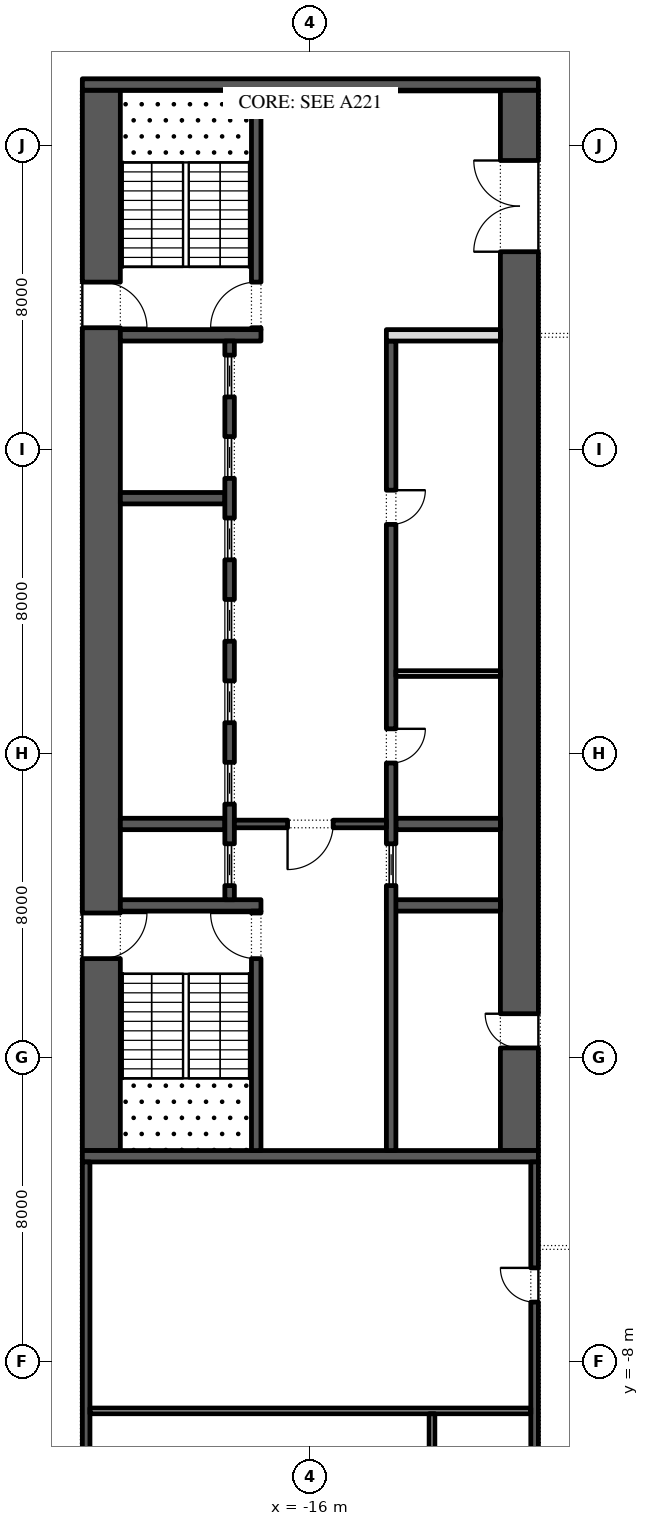
"""IFC4 building model, lengths in metres.
Left out: names, types, materials, properties, quantities, classifications, styles, units other than length and angle.
Written with IfcOpenShell. Run it as: python <this file> out.ifc"""

import sys

from ifc_helpers import new_model, si_unit, direction, frame, frame_2d, origin, place, context, subcontext, project, spatial, rectangle, extrude, element, fill, save


model = new_model("IFC4")
c1 = context("Model", 3, precision=1e-05, world=origin(), true_north=direction((0.0, 1.0)))
c2 = subcontext(c1, "Body", "Model", "MODEL_VIEW")
j1 = project(units=[si_unit("LENGTHUNIT", "METRE"), si_unit("PLANEANGLEUNIT", "RADIAN")], contexts=[c1])
p1 = place(None, origin())
s1 = spatial("IfcSite", under=j1, at=p1, CompositionType="ELEMENT")
p2 = place(p1, origin())
s2 = spatial("IfcBuilding", under=s1, at=p2, CompositionType="ELEMENT")
p3 = place(p2, frame((0.0, 0.0, 85.8)))
s3 = spatial("IfcBuildingStorey", under=s2, at=p3, CompositionType="ELEMENT", Elevation=85.8)
p4 = place(p3, frame((-21.5, -2.45, 0.0), z_axis=(0.0, 0.0, 1.0), x_axis=(0.0, 1.0, 0.0)))
e1 = element("IfcWall", 1, at=p4, inside=s3, PredefinedType="SHEAR", context=c2, shape_type="SweptSolid", body=[
    extrude(rectangle(XDim=27.9, YDim=1.0, at=frame_2d((13.95, 0.0))), origin(), (0.0, 0.0, 1.0), 3.95),
])
p5 = place(p4, frame((5.05, 0.0, 0.0)))
e2 = element("IfcOpeningElement", 2, at=p5, cuts=e1, PredefinedType="OPENING", context=c2, shape_type="SweptSolid", body=[
    extrude(rectangle(XDim=1.2, YDim=2.1, at=frame_2d((0.6, 1.05))), frame((0.0, 0.51, 0.0), z_axis=(0.0, -1.0, 0.0), x_axis=(1.0, 0.0, 0.0)), (0.0, 0.0, 1.0), 1.02),
])
p6 = place(p4, frame((21.65, 0.0, 0.0)))
e3 = element("IfcOpeningElement", 3, at=p6, cuts=e1, PredefinedType="OPENING", context=c2, shape_type="SweptSolid", body=[
    extrude(rectangle(XDim=1.2, YDim=2.1, at=frame_2d((0.6, 1.05))), frame((0.0, 0.51, 0.0), z_axis=(0.0, -1.0, 0.0), x_axis=(1.0, 0.0, 0.0)), (0.0, 0.0, 1.0), 1.02),
])
p7 = place(p3, frame((-10.5, -2.45, 0.0), z_axis=(0.0, 0.0, 1.0), x_axis=(0.0, 1.0, 0.0)))
e4 = element("IfcWall", 4, at=p7, inside=s3, PredefinedType="SHEAR", context=c2, shape_type="SweptSolid", body=[
    extrude(rectangle(XDim=27.9, YDim=1.0, at=frame_2d((13.95, 0.0))), origin(), (0.0, 0.0, 1.0), 3.95),
])
p8 = place(p7, frame((23.65, 0.0, 0.0)))
e5 = element("IfcOpeningElement", 5, at=p8, cuts=e4, PredefinedType="OPENING", context=c2, shape_type="SweptSolid", body=[
    extrude(rectangle(XDim=2.4, YDim=2.1, at=frame_2d((1.2, 1.05))), frame((0.0, 0.51, 0.0), z_axis=(0.0, -1.0, 0.0), x_axis=(1.0, 0.0, 0.0)), (0.0, 0.0, 1.0), 1.02),
])
p9 = place(p7, frame((2.7, 0.0, 0.0)))
e6 = element("IfcOpeningElement", 6, at=p9, cuts=e4, PredefinedType="OPENING", context=c2, shape_type="SweptSolid", body=[
    extrude(rectangle(XDim=0.9, YDim=2.1, at=frame_2d((0.45, 1.05))), frame((0.0, 0.51, 0.0), z_axis=(0.0, -1.0, 0.0), x_axis=(1.0, 0.0, 0.0)), (0.0, 0.0, 1.0), 1.02),
])
for number, where, z_axis, x_axis in (
    (7, (-22.0, -2.6, 0.0), (0.0, 0.0, 1.0), (1.0, 0.0, 0.0)),
    (8, (-22.0, 25.6, 0.0), (0.0, 0.0, 1.0), (1.0, 0.0, 0.0)),
):
    element("IfcWall", number, at=place(p3, frame(where, z_axis=z_axis, x_axis=x_axis)), inside=s3, PredefinedType="SHEAR", context=c2, shape_type="SweptSolid", body=[
        extrude(rectangle(XDim=12.0, YDim=0.3, at=frame_2d((6.0, 0.0))), origin(), (0.0, 0.0, 1.0), 3.95),
    ])
p10 = place(p3, frame((-21.0, 4.0, 0.0), z_axis=(0.0, 0.0, 1.0), x_axis=(1.0, 0.0, 0.0)))
e9 = element("IfcWall", 9, at=p10, inside=s3, PredefinedType="SHEAR", context=c2, shape_type="SweptSolid", body=[
    extrude(rectangle(XDim=3.7, YDim=0.3, at=frame_2d((1.85, 0.0))), origin(), (0.0, 0.0, 1.0), 3.95),
])
p11 = place(p3, frame((-17.425, -2.45, 0.0), z_axis=(0.0, 0.0, 1.0), x_axis=(0.0, 1.0, 0.0)))
e10 = element("IfcWall", 10, at=p11, inside=s3, PredefinedType="SHEAR", context=c2, shape_type="SweptSolid", body=[
    extrude(rectangle(XDim=6.3, YDim=0.25, at=frame_2d((3.15, 0.0))), origin(), (0.0, 0.0, 1.0), 3.95),
])
p12 = place(p11, frame((5.05, 0.0, 0.0)))
e11 = element("IfcOpeningElement", 11, at=p12, cuts=e10, PredefinedType="OPENING", context=c2, shape_type="SweptSolid", body=[
    extrude(rectangle(XDim=1.2, YDim=2.1, at=frame_2d((0.6, 1.05))), frame((0.0, 0.135, 0.0), z_axis=(0.0, -1.0, 0.0), x_axis=(1.0, 0.0, 0.0)), (0.0, 0.0, 1.0), 0.27),
])
p13 = place(p3, frame((-21.0, 19.0, 0.0), z_axis=(0.0, 0.0, 1.0), x_axis=(1.0, 0.0, 0.0)))
e12 = element("IfcWall", 12, at=p13, inside=s3, PredefinedType="SHEAR", context=c2, shape_type="SweptSolid", body=[
    extrude(rectangle(XDim=3.7, YDim=0.3, at=frame_2d((1.85, 0.0))), origin(), (0.0, 0.0, 1.0), 3.95),
])
p14 = place(p3, frame((-17.425, 19.15, 0.0), z_axis=(0.0, 0.0, 1.0), x_axis=(0.0, 1.0, 0.0)))
e13 = element("IfcWall", 13, at=p14, inside=s3, PredefinedType="SHEAR", context=c2, shape_type="SweptSolid", body=[
    extrude(rectangle(XDim=6.3, YDim=0.25, at=frame_2d((3.15, 0.0))), origin(), (0.0, 0.0, 1.0), 3.95),
])
p15 = place(p14, frame((0.05, 0.0, 0.0)))
e14 = element("IfcOpeningElement", 14, at=p15, cuts=e13, PredefinedType="OPENING", context=c2, shape_type="SweptSolid", body=[
    extrude(rectangle(XDim=1.2, YDim=2.1, at=frame_2d((0.6, 1.05))), frame((0.0, 0.135, 0.0), z_axis=(0.0, -1.0, 0.0), x_axis=(1.0, 0.0, 0.0)), (0.0, 0.0, 1.0), 0.27),
])
for number, where, z_axis, x_axis in (
    (15, (-21.0, 6.143, 0.0), (0.0, 0.0, 1.0), (1.0, 0.0, 0.0)),
    (16, (-21.0, 14.714, 0.0), (0.0, 0.0, 1.0), (1.0, 0.0, 0.0)),
):
    element("IfcWall", number, at=place(p3, frame(where, z_axis=z_axis, x_axis=x_axis)), inside=s3, PredefinedType="SHEAR", context=c2, shape_type="SweptSolid", body=[
        extrude(rectangle(XDim=2.75, YDim=0.3, at=frame_2d((1.375, 0.0))), origin(), (0.0, 0.0, 1.0), 3.95),
    ])
p16 = place(p3, frame((-18.125, 4.15, 0.0), z_axis=(0.0, 0.0, 1.0), x_axis=(0.0, 1.0, 0.0)))
e17 = element("IfcWall", 17, at=p16, inside=s3, PredefinedType="SHEAR", context=c2, shape_type="SweptSolid", body=[
    extrude(rectangle(XDim=14.7, YDim=0.25, at=frame_2d((7.35, 0.0))), origin(), (0.0, 0.0, 1.0), 3.95),
])
p17 = place(p16, frame((0.371, 0.0, 0.0)))
e18 = element("IfcOpeningElement", 18, at=p17, cuts=e17, PredefinedType="OPENING", context=c2, shape_type="SweptSolid", body=[
    extrude(rectangle(XDim=1.1, YDim=2.1, at=frame_2d((0.55, 1.05))), frame((0.0, 0.135, 0.0), z_axis=(0.0, -1.0, 0.0), x_axis=(1.0, 0.0, 0.0)), (0.0, 0.0, 1.0), 0.27),
])
p18 = place(p16, frame((2.514, 0.0, 0.0)))
e19 = element("IfcOpeningElement", 19, at=p18, cuts=e17, PredefinedType="OPENING", context=c2, shape_type="SweptSolid", body=[
    extrude(rectangle(XDim=1.1, YDim=2.1, at=frame_2d((0.55, 1.05))), frame((0.0, 0.135, 0.0), z_axis=(0.0, -1.0, 0.0), x_axis=(1.0, 0.0, 0.0)), (0.0, 0.0, 1.0), 0.27),
])
p19 = place(p16, frame((4.657, 0.0, 0.0)))
e20 = element("IfcOpeningElement", 20, at=p19, cuts=e17, PredefinedType="OPENING", context=c2, shape_type="SweptSolid", body=[
    extrude(rectangle(XDim=1.1, YDim=2.1, at=frame_2d((0.55, 1.05))), frame((0.0, 0.135, 0.0), z_axis=(0.0, -1.0, 0.0), x_axis=(1.0, 0.0, 0.0)), (0.0, 0.0, 1.0), 0.27),
])
p20 = place(p16, frame((6.8, 0.0, 0.0)))
e21 = element("IfcOpeningElement", 21, at=p20, cuts=e17, PredefinedType="OPENING", context=c2, shape_type="SweptSolid", body=[
    extrude(rectangle(XDim=1.1, YDim=2.1, at=frame_2d((0.55, 1.05))), frame((0.0, 0.135, 0.0), z_axis=(0.0, -1.0, 0.0), x_axis=(1.0, 0.0, 0.0)), (0.0, 0.0, 1.0), 0.27),
])
p21 = place(p16, frame((8.943, 0.0, 0.0)))
e22 = element("IfcOpeningElement", 22, at=p21, cuts=e17, PredefinedType="OPENING", context=c2, shape_type="SweptSolid", body=[
    extrude(rectangle(XDim=1.1, YDim=2.1, at=frame_2d((0.55, 1.05))), frame((0.0, 0.135, 0.0), z_axis=(0.0, -1.0, 0.0), x_axis=(1.0, 0.0, 0.0)), (0.0, 0.0, 1.0), 0.27),
])
p22 = place(p16, frame((11.086, 0.0, 0.0)))
e23 = element("IfcOpeningElement", 23, at=p22, cuts=e17, PredefinedType="OPENING", context=c2, shape_type="SweptSolid", body=[
    extrude(rectangle(XDim=1.1, YDim=2.1, at=frame_2d((0.55, 1.05))), frame((0.0, 0.135, 0.0), z_axis=(0.0, -1.0, 0.0), x_axis=(1.0, 0.0, 0.0)), (0.0, 0.0, 1.0), 0.27),
])
p23 = place(p16, frame((13.229, 0.0, 0.0)))
e24 = element("IfcOpeningElement", 24, at=p23, cuts=e17, PredefinedType="OPENING", context=c2, shape_type="SweptSolid", body=[
    extrude(rectangle(XDim=1.1, YDim=2.1, at=frame_2d((0.55, 1.05))), frame((0.0, 0.135, 0.0), z_axis=(0.0, -1.0, 0.0), x_axis=(1.0, 0.0, 0.0)), (0.0, 0.0, 1.0), 0.27),
])
p24 = place(p3, frame((-14.0, 4.0, 0.0), z_axis=(0.0, 0.0, 1.0), x_axis=(1.0, 0.0, 0.0)))
e25 = element("IfcWall", 25, at=p24, inside=s3, PredefinedType="SHEAR", context=c2, shape_type="SweptSolid", body=[
    extrude(rectangle(XDim=3.0, YDim=0.3, at=frame_2d((1.5, 0.0))), origin(), (0.0, 0.0, 1.0), 3.95),
])
p25 = place(p3, frame((-13.75, 6.143, 0.0), z_axis=(0.0, 0.0, 1.0), x_axis=(1.0, 0.0, 0.0)))
e26 = element("IfcWall", 26, at=p25, inside=s3, PredefinedType="SHEAR", context=c2, shape_type="SweptSolid", body=[
    extrude(rectangle(XDim=2.75, YDim=0.3, at=frame_2d((1.375, 0.0))), origin(), (0.0, 0.0, 1.0), 3.95),
])
p26 = place(p3, frame((-13.875, -2.45, 0.0), z_axis=(0.0, 0.0, 1.0), x_axis=(0.0, 1.0, 0.0)))
e27 = element("IfcWall", 27, at=p26, inside=s3, PredefinedType="SHEAR", context=c2, shape_type="SweptSolid", body=[
    extrude(rectangle(XDim=21.3, YDim=0.25, at=frame_2d((10.65, 0.0))), origin(), (0.0, 0.0, 1.0), 3.95),
])
p27 = place(p26, frame((10.196, 0.0, 0.0)))
e28 = element("IfcOpeningElement", 28, at=p27, cuts=e27, PredefinedType="OPENING", context=c2, shape_type="SweptSolid", body=[
    extrude(rectangle(XDim=0.9, YDim=2.1, at=frame_2d((0.45, 1.05))), frame((0.0, 0.135, 0.0), z_axis=(0.0, -1.0, 0.0), x_axis=(1.0, 0.0, 0.0)), (0.0, 0.0, 1.0), 0.27),
])
p28 = place(p26, frame((16.475, 0.0, 0.0)))
e29 = element("IfcOpeningElement", 29, at=p28, cuts=e27, PredefinedType="OPENING", context=c2, shape_type="SweptSolid", body=[
    extrude(rectangle(XDim=0.9, YDim=2.1, at=frame_2d((0.45, 1.05))), frame((0.0, 0.135, 0.0), z_axis=(0.0, -1.0, 0.0), x_axis=(1.0, 0.0, 0.0)), (0.0, 0.0, 1.0), 0.27),
])
p29 = place(p26, frame((6.971, 0.0, 0.0)))
e30 = element("IfcOpeningElement", 30, at=p29, cuts=e27, PredefinedType="OPENING", context=c2, shape_type="SweptSolid", body=[
    extrude(rectangle(XDim=1.1, YDim=2.1, at=frame_2d((0.55, 1.05))), frame((0.0, 0.135, 0.0), z_axis=(0.0, -1.0, 0.0), x_axis=(1.0, 0.0, 0.0)), (0.0, 0.0, 1.0), 0.27),
])
p30 = place(p3, frame((-14.0, 19.0, 0.0), z_axis=(0.0, 0.0, 1.0), x_axis=(1.0, 0.0, 0.0)))
e31 = element("IfcWall", 31, at=p30, inside=s3, PredefinedType="PARTITIONING", context=c2, shape_type="SweptSolid", body=[
    extrude(rectangle(XDim=3.0, YDim=0.3, at=frame_2d((1.5, 0.0))), origin(), (0.0, 0.0, 1.0), 3.95),
])
p31 = place(p3, frame((-13.75, 10.1, 0.0), z_axis=(0.0, 0.0, 1.0), x_axis=(1.0, 0.0, 0.0)))
e32 = element("IfcWall", 32, at=p31, inside=s3, PredefinedType="PARTITIONING", context=c2, shape_type="SweptSolid", body=[
    extrude(rectangle(XDim=2.75, YDim=0.15, at=frame_2d((1.375, 0.0))), origin(), (0.0, 0.0, 1.0), 3.95),
])
p32 = place(p3, frame((-18.0, 6.143, 0.0), z_axis=(0.0, 0.0, 1.0), x_axis=(1.0, 0.0, 0.0)))
e33 = element("IfcWall", 33, at=p32, inside=s3, PredefinedType="SHEAR", context=c2, shape_type="SweptSolid", body=[
    extrude(rectangle(XDim=4.0, YDim=0.2, at=frame_2d((2.0, 0.0))), origin(), (0.0, 0.0, 1.0), 3.95),
])
p33 = place(p32, frame((1.4, 0.0, 0.0)))
e34 = element("IfcOpeningElement", 34, at=p33, cuts=e33, PredefinedType="OPENING", context=c2, shape_type="SweptSolid", body=[
    extrude(rectangle(XDim=1.2, YDim=2.1, at=frame_2d((0.6, 1.05))), frame((0.0, 0.11, 0.0), z_axis=(0.0, -1.0, 0.0), x_axis=(1.0, 0.0, 0.0)), (0.0, 0.0, 1.0), 0.22),
])
p34 = place(p3, frame((-21.9, -15.8, 0.0), z_axis=(0.0, 0.0, 1.0), x_axis=(0.0, 1.0, 0.0)))
e35 = element("IfcWall", 35, at=p34, inside=s3, PredefinedType="SHEAR", context=c2, shape_type="SweptSolid", body=[
    extrude(rectangle(XDim=13.05, YDim=0.2, at=frame_2d((6.525, 0.0))), origin(), (0.0, 0.0, 1.0), 3.95),
])
p35 = place(p34, frame((4.462, 0.0, 0.0)))
e36 = element("IfcOpeningElement", 36, at=p35, cuts=e35, PredefinedType="OPENING", context=c2, shape_type="SweptSolid", body=[
    extrude(rectangle(XDim=0.9, YDim=2.1, at=frame_2d((0.45, 1.05))), frame((0.0, 0.11, 0.0), z_axis=(0.0, -1.0, 0.0), x_axis=(1.0, 0.0, 0.0)), (0.0, 0.0, 1.0), 0.22),
])
p36 = place(p3, frame((-10.1, -15.8, 0.0), z_axis=(0.0, 0.0, 1.0), x_axis=(0.0, 1.0, 0.0)))
e37 = element("IfcWall", 37, at=p36, inside=s3, PredefinedType="SHEAR", context=c2, shape_type="SweptSolid", body=[
    extrude(rectangle(XDim=13.05, YDim=0.2, at=frame_2d((6.525, 0.0))), origin(), (0.0, 0.0, 1.0), 3.95),
])
p37 = place(p36, frame((1.175, 0.0, 0.0)))
e38 = element("IfcOpeningElement", 38, at=p37, cuts=e37, PredefinedType="OPENING", context=c2, shape_type="SweptSolid", body=[
    extrude(rectangle(XDim=0.9, YDim=2.1, at=frame_2d((0.45, 1.05))), frame((0.0, 0.11, 0.0), z_axis=(0.0, -1.0, 0.0), x_axis=(1.0, 0.0, 0.0)), (0.0, 0.0, 1.0), 0.22),
])
p38 = place(p36, frame((4.413, 0.0, 0.0)))
e39 = element("IfcOpeningElement", 39, at=p38, cuts=e37, PredefinedType="OPENING", context=c2, shape_type="SweptSolid", body=[
    extrude(rectangle(XDim=1.0, YDim=2.1, at=frame_2d((0.5, 1.05))), frame((0.0, 0.11, 0.0), z_axis=(0.0, -1.0, 0.0), x_axis=(1.0, 0.0, 0.0)), (0.0, 0.0, 1.0), 0.22),
])
p39 = place(p36, frame((9.363, 0.0, 0.0)))
e40 = element("IfcOpeningElement", 40, at=p39, cuts=e37, PredefinedType="OPENING", context=c2, shape_type="SweptSolid", body=[
    extrude(rectangle(XDim=0.9, YDim=2.1, at=frame_2d((0.45, 1.05))), frame((0.0, 0.11, 0.0), z_axis=(0.0, -1.0, 0.0), x_axis=(1.0, 0.0, 0.0)), (0.0, 0.0, 1.0), 0.22),
])
p40 = place(p3, frame((-21.8, -9.3, 0.0), z_axis=(0.0, 0.0, 1.0), x_axis=(1.0, 0.0, 0.0)))
e41 = element("IfcWall", 41, at=p40, inside=s3, PredefinedType="PARTITIONING", context=c2, shape_type="SweptSolid", body=[
    extrude(rectangle(XDim=11.6, YDim=0.15, at=frame_2d((5.8, 0.0))), origin(), (0.0, 0.0, 1.0), 3.95),
])
p41 = place(p3, frame((-12.8, -12.4, 0.0), z_axis=(0.0, 0.0, 1.0), x_axis=(0.0, 1.0, 0.0)))
e42 = element("IfcWall", 42, at=p41, inside=s3, PredefinedType="PARTITIONING", context=c2, shape_type="SweptSolid", body=[
    extrude(rectangle(XDim=3.025, YDim=0.15, at=frame_2d((1.512, 0.0))), origin(), (0.0, 0.0, 1.0), 3.95),
])
p42 = place(p17, origin())
e43 = element("IfcDoor", 43, at=p42, inside=s3, OperationType="SLIDING_TO_LEFT", PredefinedType="DOOR", context=c2, shape_type="SweptSolid", body=[
    extrude(rectangle(XDim=1.1, YDim=2.1, at=frame_2d((0.55, 1.05))), frame((0.0, 0.025, 0.0), z_axis=(0.0, -1.0, 0.0), x_axis=(1.0, 0.0, 0.0)), (0.0, 0.0, 1.0), 0.05),
])
fill(e18, e43)
p43 = place(p18, origin())
e44 = element("IfcDoor", 44, at=p43, inside=s3, OperationType="SLIDING_TO_LEFT", PredefinedType="DOOR", context=c2, shape_type="SweptSolid", body=[
    extrude(rectangle(XDim=1.1, YDim=2.1, at=frame_2d((0.55, 1.05))), frame((0.0, 0.025, 0.0), z_axis=(0.0, -1.0, 0.0), x_axis=(1.0, 0.0, 0.0)), (0.0, 0.0, 1.0), 0.05),
])
fill(e19, e44)
p44 = place(p19, origin())
e45 = element("IfcDoor", 45, at=p44, inside=s3, OperationType="SLIDING_TO_LEFT", PredefinedType="DOOR", context=c2, shape_type="SweptSolid", body=[
    extrude(rectangle(XDim=1.1, YDim=2.1, at=frame_2d((0.55, 1.05))), frame((0.0, 0.025, 0.0), z_axis=(0.0, -1.0, 0.0), x_axis=(1.0, 0.0, 0.0)), (0.0, 0.0, 1.0), 0.05),
])
fill(e20, e45)
p45 = place(p20, origin())
e46 = element("IfcDoor", 46, at=p45, inside=s3, OperationType="SLIDING_TO_LEFT", PredefinedType="DOOR", context=c2, shape_type="SweptSolid", body=[
    extrude(rectangle(XDim=1.1, YDim=2.1, at=frame_2d((0.55, 1.05))), frame((0.0, 0.025, 0.0), z_axis=(0.0, -1.0, 0.0), x_axis=(1.0, 0.0, 0.0)), (0.0, 0.0, 1.0), 0.05),
])
fill(e21, e46)
p46 = place(p21, origin())
e47 = element("IfcDoor", 47, at=p46, inside=s3, OperationType="SLIDING_TO_LEFT", PredefinedType="DOOR", context=c2, shape_type="SweptSolid", body=[
    extrude(rectangle(XDim=1.1, YDim=2.1, at=frame_2d((0.55, 1.05))), frame((0.0, 0.025, 0.0), z_axis=(0.0, -1.0, 0.0), x_axis=(1.0, 0.0, 0.0)), (0.0, 0.0, 1.0), 0.05),
])
fill(e22, e47)
p47 = place(p22, origin())
e48 = element("IfcDoor", 48, at=p47, inside=s3, OperationType="SLIDING_TO_LEFT", PredefinedType="DOOR", context=c2, shape_type="SweptSolid", body=[
    extrude(rectangle(XDim=1.1, YDim=2.1, at=frame_2d((0.55, 1.05))), frame((0.0, 0.025, 0.0), z_axis=(0.0, -1.0, 0.0), x_axis=(1.0, 0.0, 0.0)), (0.0, 0.0, 1.0), 0.05),
])
fill(e23, e48)
p48 = place(p23, origin())
e49 = element("IfcDoor", 49, at=p48, inside=s3, OperationType="SLIDING_TO_LEFT", PredefinedType="DOOR", context=c2, shape_type="SweptSolid", body=[
    extrude(rectangle(XDim=1.1, YDim=2.1, at=frame_2d((0.55, 1.05))), frame((0.0, 0.025, 0.0), z_axis=(0.0, -1.0, 0.0), x_axis=(1.0, 0.0, 0.0)), (0.0, 0.0, 1.0), 0.05),
])
fill(e24, e49)
p49 = place(p27, frame((0.9, -0.2, 0.0), z_axis=(0.0, 0.0, 1.0), x_axis=(-1.0, 0.0, 0.0)))
e50 = element("IfcDoor", 50, at=p49, inside=s3, OperationType="SINGLE_SWING_RIGHT", PredefinedType="DOOR", context=c2, shape_type="SweptSolid", body=[
    extrude(rectangle(XDim=0.9, YDim=2.1, at=frame_2d((0.45, 1.05))), frame((0.0, -0.075, 0.0), z_axis=(0.0, -1.0, 0.0), x_axis=(1.0, 0.0, 0.0)), (0.0, 0.0, 1.0), 0.05),
])
fill(e28, e50)
p50 = place(p28, frame((0.9, -0.2, 0.0), z_axis=(0.0, 0.0, 1.0), x_axis=(-1.0, 0.0, 0.0)))
e51 = element("IfcDoor", 51, at=p50, inside=s3, OperationType="SINGLE_SWING_RIGHT", PredefinedType="DOOR", context=c2, shape_type="SweptSolid", body=[
    extrude(rectangle(XDim=0.9, YDim=2.1, at=frame_2d((0.45, 1.05))), frame((0.0, -0.075, 0.0), z_axis=(0.0, -1.0, 0.0), x_axis=(1.0, 0.0, 0.0)), (0.0, 0.0, 1.0), 0.05),
])
fill(e29, e51)
p51 = place(p29, origin())
e52 = element("IfcDoor", 52, at=p51, inside=s3, OperationType="SLIDING_TO_LEFT", PredefinedType="DOOR", context=c2, shape_type="SweptSolid", body=[
    extrude(rectangle(XDim=1.1, YDim=2.1, at=frame_2d((0.55, 1.05))), frame((0.0, 0.025, 0.0), z_axis=(0.0, -1.0, 0.0), x_axis=(1.0, 0.0, 0.0)), (0.0, 0.0, 1.0), 0.05),
])
fill(e30, e52)
p52 = place(p33, frame((1.2, 0.0, 0.0), z_axis=(0.0, 0.0, 1.0), x_axis=(-1.0, 0.0, 0.0)))
e53 = element("IfcDoor", 53, at=p52, inside=s3, OperationType="SINGLE_SWING_LEFT", PredefinedType="DOOR", context=c2, shape_type="SweptSolid", body=[
    extrude(rectangle(XDim=1.2, YDim=2.1, at=frame_2d((0.6, 1.05))), frame((0.0, 0.025, 0.0), z_axis=(0.0, -1.0, 0.0), x_axis=(1.0, 0.0, 0.0)), (0.0, 0.0, 1.0), 0.05),
])
fill(e34, e53)
p53 = place(p8, origin())
e54 = element("IfcDoor", 54, at=p53, inside=s3, OperationType="DOUBLE_DOOR_SINGLE_SWING", PredefinedType="DOOR", context=c2, shape_type="SweptSolid", body=[
    extrude(rectangle(XDim=2.4, YDim=2.1, at=frame_2d((1.2, 1.05))), frame((0.0, 0.025, 0.0), z_axis=(0.0, -1.0, 0.0), x_axis=(1.0, 0.0, 0.0)), (0.0, 0.0, 1.0), 0.05),
])
fill(e5, e54)
p54 = place(p12, origin())
e55 = element("IfcDoor", 55, at=p54, inside=s3, OperationType="SINGLE_SWING_LEFT", PredefinedType="DOOR", context=c2, shape_type="SweptSolid", body=[
    extrude(rectangle(XDim=1.2, YDim=2.1, at=frame_2d((0.6, 1.05))), frame((0.0, 0.025, 0.0), z_axis=(0.0, -1.0, 0.0), x_axis=(1.0, 0.0, 0.0)), (0.0, 0.0, 1.0), 0.05),
])
fill(e11, e55)
p55 = place(p5, frame((1.2, 0.0, 0.0), z_axis=(0.0, 0.0, 1.0), x_axis=(-1.0, 0.0, 0.0)))
e56 = element("IfcDoor", 56, at=p55, inside=s3, OperationType="SINGLE_SWING_RIGHT", PredefinedType="DOOR", context=c2, shape_type="SweptSolid", body=[
    extrude(rectangle(XDim=1.2, YDim=2.1, at=frame_2d((0.6, 1.05))), frame((0.0, 0.025, 0.0), z_axis=(0.0, -1.0, 0.0), x_axis=(1.0, 0.0, 0.0)), (0.0, 0.0, 1.0), 0.05),
])
fill(e2, e56)
p56 = place(p15, origin())
e57 = element("IfcDoor", 57, at=p56, inside=s3, OperationType="SINGLE_SWING_RIGHT", PredefinedType="DOOR", context=c2, shape_type="SweptSolid", body=[
    extrude(rectangle(XDim=1.2, YDim=2.1, at=frame_2d((0.6, 1.05))), frame((0.0, 0.025, 0.0), z_axis=(0.0, -1.0, 0.0), x_axis=(1.0, 0.0, 0.0)), (0.0, 0.0, 1.0), 0.05),
])
fill(e14, e57)
p57 = place(p6, frame((1.2, 0.0, 0.0), z_axis=(0.0, 0.0, 1.0), x_axis=(-1.0, 0.0, 0.0)))
e58 = element("IfcDoor", 58, at=p57, inside=s3, OperationType="SINGLE_SWING_LEFT", PredefinedType="DOOR", context=c2, shape_type="SweptSolid", body=[
    extrude(rectangle(XDim=1.2, YDim=2.1, at=frame_2d((0.6, 1.05))), frame((0.0, 0.025, 0.0), z_axis=(0.0, -1.0, 0.0), x_axis=(1.0, 0.0, 0.0)), (0.0, 0.0, 1.0), 0.05),
])
fill(e3, e58)
p58 = place(p9, origin())
e59 = element("IfcDoor", 59, at=p58, inside=s3, OperationType="SINGLE_SWING_LEFT", PredefinedType="DOOR", context=c2, shape_type="SweptSolid", body=[
    extrude(rectangle(XDim=0.9, YDim=2.1, at=frame_2d((0.45, 1.05))), frame((0.0, 0.5, 0.0), z_axis=(0.0, -1.0, 0.0), x_axis=(1.0, 0.0, 0.0)), (0.0, 0.0, 1.0), 0.05),
])
fill(e6, e59)
p59 = place(p39, origin())
e60 = element("IfcDoor", 60, at=p59, inside=s3, OperationType="SINGLE_SWING_LEFT", PredefinedType="DOOR", context=c2, shape_type="SweptSolid", body=[
    extrude(rectangle(XDim=0.9, YDim=2.1, at=frame_2d((0.45, 1.05))), frame((0.0, 0.1, 0.0), z_axis=(0.0, -1.0, 0.0), x_axis=(1.0, 0.0, 0.0)), (0.0, 0.0, 1.0), 0.05),
])
fill(e40, e60)
save(model, sys.argv[1])
